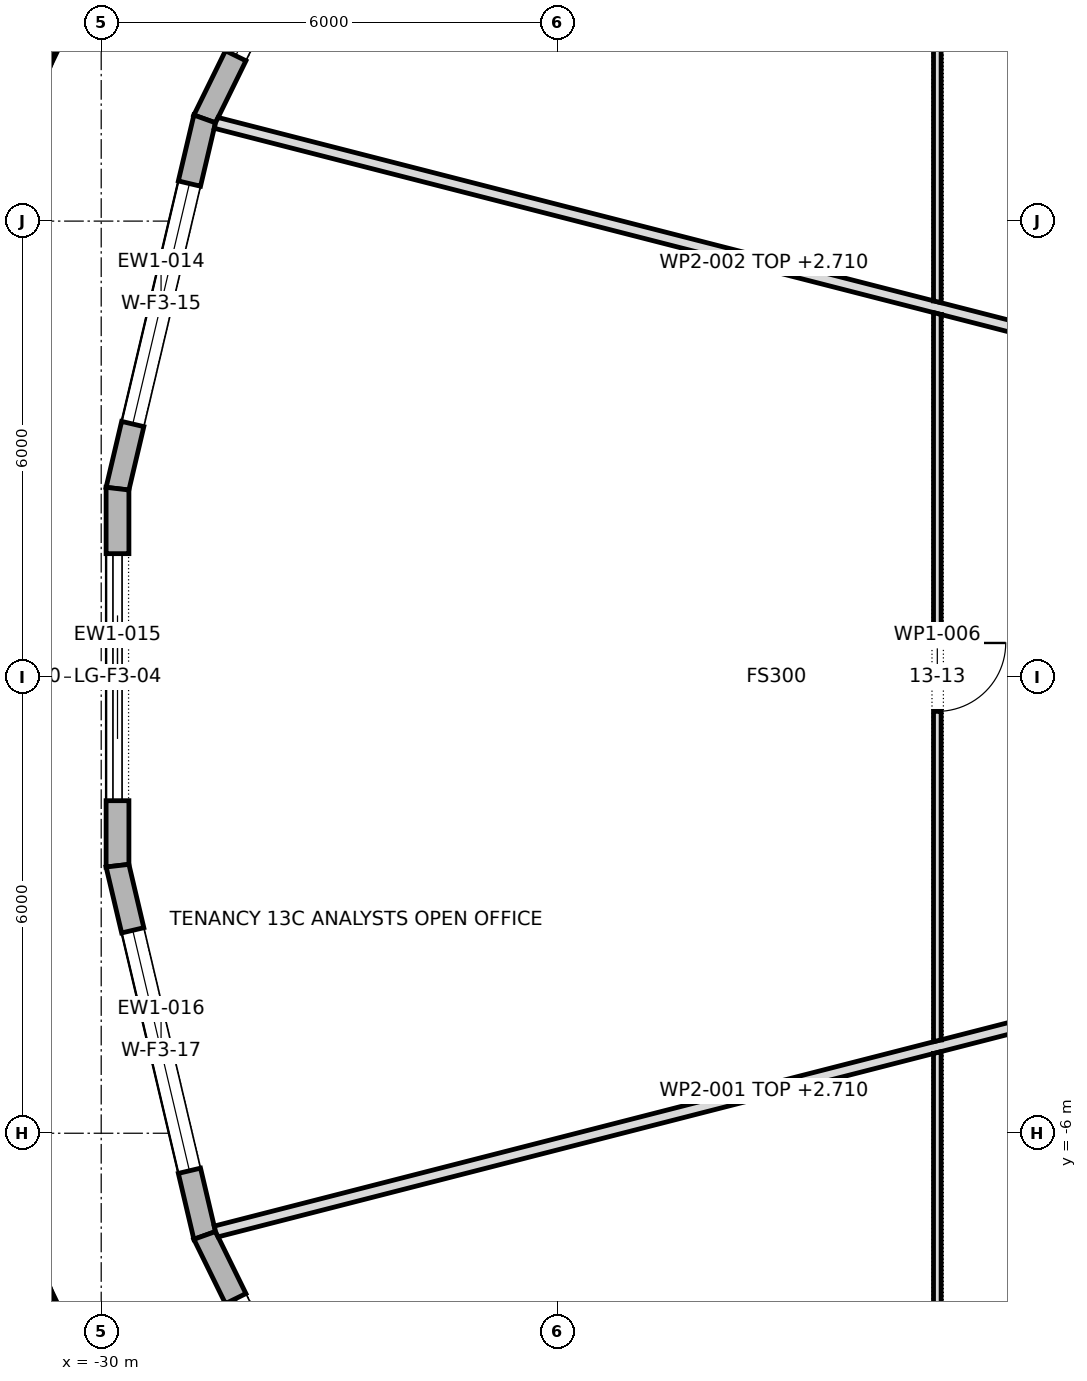
"""IFC4 building model, lengths in metres.
Left out: names, types, materials, properties, quantities, classifications, styles, units other than length and angle.
Written with IfcOpenShell. Run it as: python <this file> out.ifc"""

import sys

from ifc_helpers import new_model, si_unit, direction, frame, frame_2d, origin, origin_2d, place, context, subcontext, project, spatial, polyline, rectangle, outline, extrude, element, fill, save


model = new_model("IFC4")
c1 = context("Model", 3, precision=1e-05, world=origin(), true_north=direction((0.0, 1.0)))
c2 = subcontext(c1, "Body", "Model", "MODEL_VIEW")
j1 = project(units=[si_unit("LENGTHUNIT", "METRE"), si_unit("PLANEANGLEUNIT", "RADIAN")], contexts=[c1])
p1 = place(None, origin())
s1 = spatial("IfcSite", under=j1, at=p1, CompositionType="ELEMENT")
p2 = place(p1, origin())
s2 = spatial("IfcBuilding", under=s1, at=p2, CompositionType="ELEMENT")
p3 = place(p2, frame((0.0, 0.0, 190.9)))
s3 = spatial("IfcBuildingStorey", under=s2, at=p3, CompositionType="ELEMENT", Elevation=190.9)
for number, where, z_axis, x_axis in (
    (1, (-31.176, 8.106, 0.0), (0.0, 0.0, 1.0), (-0.334, -0.943, 0.0)),
    (2, (-31.176, -8.106, 0.0), (0.0, 0.0, 1.0), (0.334, -0.943, 0.0)),
):
    element("IfcColumn", number, at=place(p3, frame(where, z_axis=z_axis, x_axis=x_axis)), inside=s3, PredefinedType="COLUMN", context=c2, shape_type="SweptSolid", body=[
        extrude(rectangle(XDim=1.2, YDim=1.0, at=origin_2d()), origin(), (0.0, 0.0, 1.0), 4.0),
    ])
p4 = place(p3, frame((-26.39, 11.924, 0.0), z_axis=(0.0, 0.0, 1.0), x_axis=(-0.440694221881, -0.897657285829, 0.0)))
e3 = element("IfcWall", 3, at=p4, inside=s3, PredefinedType="STANDARD", context=c2, shape_type="SweptSolid", body=[
    extrude(outline(polyline([(-0.016, -0.15), (5.119, -0.15), (5.085, 0.15), (0.016, 0.15), (-0.016, -0.15)])), origin(), (0.0, 0.0, 1.0), 3.7),
])
p5 = place(p4, frame((0.926, 0.0, 0.6)))
e4 = element("IfcOpeningElement", 4, at=p5, cuts=e3, PredefinedType="OPENING", context=c2, shape_type="SweptSolid", body=[
    extrude(rectangle(XDim=3.25, YDim=2.65, at=frame_2d((1.625, 1.325))), frame((0.0, 0.162, 0.0), z_axis=(0.0, -1.0, 0.0), x_axis=(1.0, 0.0, 0.0)), (0.0, 0.0, 1.0), 0.324),
])
p6 = place(p3, frame((-28.639, 7.344, 0.0), z_axis=(0.0, 0.0, 1.0), x_axis=(-0.229455912692, -0.97331905567, 0.0)))
e5 = element("IfcWall", 5, at=p6, inside=s3, PredefinedType="STANDARD", context=c2, shape_type="SweptSolid", body=[
    extrude(outline(polyline([(-0.017, -0.15), (5.015, -0.15), (4.98, 0.15), (0.017, 0.15), (-0.017, -0.15)])), origin(), (0.0, 0.0, 1.0), 3.7),
])
p7 = place(p6, frame((0.874, 0.0, 0.6)))
e6 = element("IfcOpeningElement", 6, at=p7, cuts=e5, PredefinedType="OPENING", context=c2, shape_type="SweptSolid", body=[
    extrude(rectangle(XDim=3.25, YDim=2.65, at=frame_2d((1.625, 1.325))), frame((0.0, 0.162, 0.0), z_axis=(0.0, -1.0, 0.0), x_axis=(1.0, 0.0, 0.0)), (0.0, 0.0, 1.0), 0.324),
])
p8 = place(p3, frame((-29.785, 2.48, 0.0), z_axis=(0.0, 0.0, 1.0), x_axis=(0.0, -1.0, 0.0)))
e7 = element("IfcWall", 7, at=p8, inside=s3, PredefinedType="STANDARD", context=c2, shape_type="SweptSolid", body=[
    extrude(outline(polyline([(-0.017, -0.15), (4.977, -0.15), (4.943, 0.15), (0.017, 0.15), (-0.017, -0.15)])), origin(), (0.0, 0.0, 1.0), 3.7),
])
p9 = place(p8, frame((0.855, 0.0, 0.0)))
e8 = element("IfcOpeningElement", 8, at=p9, cuts=e7, PredefinedType="OPENING", context=c2, shape_type="SweptSolid", body=[
    extrude(rectangle(XDim=3.25, YDim=3.25, at=frame_2d((1.625, 1.625))), frame((0.0, 0.162, 0.0), z_axis=(0.0, -1.0, 0.0), x_axis=(1.0, 0.0, 0.0)), (0.0, 0.0, 1.0), 0.324),
])
p10 = place(p3, frame((-29.785, -2.48, 0.0), z_axis=(0.0, 0.0, 1.0), x_axis=(0.229455912692, -0.97331905567, 0.0)))
e9 = element("IfcWall", 9, at=p10, inside=s3, PredefinedType="STANDARD", context=c2, shape_type="SweptSolid", body=[
    extrude(outline(polyline([(-0.017, -0.15), (5.014, -0.15), (4.981, 0.15), (0.017, 0.15), (-0.017, -0.15)])), origin(), (0.0, 0.0, 1.0), 3.7),
])
p11 = place(p10, frame((0.874, 0.0, 0.6)))
e10 = element("IfcOpeningElement", 10, at=p11, cuts=e9, PredefinedType="OPENING", context=c2, shape_type="SweptSolid", body=[
    extrude(rectangle(XDim=3.25, YDim=2.65, at=frame_2d((1.625, 1.325))), frame((0.0, 0.162, 0.0), z_axis=(0.0, -1.0, 0.0), x_axis=(1.0, 0.0, 0.0)), (0.0, 0.0, 1.0), 0.324),
])
p12 = place(p3, frame((-28.639, -7.344, 0.0), z_axis=(0.0, 0.0, 1.0), x_axis=(0.440694221881, -0.897657285829, 0.0)))
e11 = element("IfcWall", 11, at=p12, inside=s3, PredefinedType="STANDARD", context=c2, shape_type="SweptSolid", body=[
    extrude(outline(polyline([(-0.017, -0.15), (5.118, -0.15), (5.086, 0.15), (0.017, 0.15), (-0.017, -0.15)])), origin(), (0.0, 0.0, 1.0), 3.7),
])
p13 = place(p12, frame((0.926, 0.0, 0.6)))
e12 = element("IfcOpeningElement", 12, at=p13, cuts=e11, PredefinedType="OPENING", context=c2, shape_type="SweptSolid", body=[
    extrude(rectangle(XDim=3.25, YDim=2.65, at=frame_2d((1.625, 1.325))), frame((0.0, 0.162, 0.0), z_axis=(0.0, -1.0, 0.0), x_axis=(1.0, 0.0, 0.0)), (0.0, 0.0, 1.0), 0.324),
])
p14 = place(p3, frame((-28.494, -7.294, 0.0), z_axis=(0.0, 0.0, 1.0), x_axis=(0.96870063855, 0.248231893342, 0.0)))
e13 = element("IfcWall", 13, at=p14, inside=s3, PredefinedType="PARTITIONING", context=c2, shape_type="SweptSolid", body=[
    extrude(outline(polyline([(0.014, -0.075), (1.957, -0.075), (3.901, -0.075), (5.844, -0.075), (7.787, -0.075), (9.73, -0.075), (9.731, -0.073), (9.736, -0.075), (11.446, -0.075), (13.156, -0.075), (14.866, -0.075), (14.904, 0.074), (14.904, 0.075), (13.227, 0.075), (11.549, 0.075), (9.872, 0.075), (9.872, 0.073), (9.866, 0.075), (7.893, 0.075), (5.92, 0.075), (3.947, 0.075), (1.973, 0.075), (0.0, 0.075), (0.0, -0.008), (0.014, -0.075)])), origin(), (0.0, 0.0, 1.0), 2.71),
])
p15 = place(p3, frame((-28.494, 7.294, 0.0), z_axis=(0.0, 0.0, 1.0), x_axis=(0.96870063855, -0.248231893342, 0.0)))
e14 = element("IfcWall", 14, at=p15, inside=s3, PredefinedType="PARTITIONING", context=c2, shape_type="SweptSolid", body=[
    extrude(outline(polyline([(0.0, -0.075), (1.973, -0.075), (3.947, -0.075), (5.92, -0.075), (7.893, -0.075), (9.866, -0.075), (9.872, -0.073), (9.872, -0.075), (11.549, -0.075), (13.227, -0.075), (14.904, -0.075), (14.904, -0.074), (14.866, 0.075), (13.156, 0.075), (11.446, 0.075), (9.736, 0.075), (9.731, 0.073), (9.73, 0.075), (7.787, 0.075), (5.844, 0.075), (3.901, 0.075), (1.957, 0.075), (0.014, 0.075), (0.0, 0.008), (0.0, -0.075)])), origin(), (0.0, 0.0, 1.0), 2.71),
])
p16 = place(p3, frame((-19.0, -13.095, 0.0), z_axis=(0.0, 0.0, 1.0), x_axis=(0.0, 1.0, 0.0)))
e15 = element("IfcWall", 15, at=p16, inside=s3, PredefinedType="PARTITIONING", context=c2, shape_type="SweptSolid", body=[
    extrude(outline(polyline([(8.169, -0.05), (8.169, -0.049), (8.144, 0.05), (6.515, 0.05), (4.886, 0.05), (3.258, 0.05), (1.629, 0.05), (0.0, 0.05), (0.0, 0.049), (0.069, -0.05), (1.689, -0.05), (3.309, -0.05), (4.929, -0.05), (6.549, -0.05), (8.169, -0.05)])), origin(), (0.0, 0.0, 1.0), 3.7),
])
p17 = place(p16, frame((3.64, 0.0, 0.0)))
e16 = element("IfcOpeningElement", 16, at=p17, cuts=e15, PredefinedType="OPENING", context=c2, shape_type="SweptSolid", body=[
    extrude(rectangle(XDim=0.9, YDim=2.1, at=frame_2d((0.45, 1.05))), frame((0.0, 0.062, 0.0), z_axis=(0.0, -1.0, 0.0), x_axis=(1.0, 0.0, 0.0)), (0.0, 0.0, 1.0), 0.124),
])
p18 = place(p3, frame((-19.0, -4.796, 0.0), z_axis=(0.0, 0.0, 1.0), x_axis=(0.0, 1.0, 0.0)))
e17 = element("IfcWall", 17, at=p18, inside=s3, PredefinedType="PARTITIONING", context=c2, shape_type="SweptSolid", body=[
    extrude(outline(polyline([(0.025, -0.05), (1.934, -0.05), (3.842, -0.05), (5.75, -0.05), (7.659, -0.05), (9.567, -0.05), (9.593, 0.049), (9.593, 0.05), (7.674, 0.05), (5.756, 0.05), (3.837, 0.05), (1.918, 0.05), (0.0, 0.05), (0.0, 0.049), (0.025, -0.05)])), origin(), (0.0, 0.0, 1.0), 3.7),
])
p19 = place(p18, frame((4.346, 0.0, 0.0)))
e18 = element("IfcOpeningElement", 18, at=p19, cuts=e17, PredefinedType="OPENING", context=c2, shape_type="SweptSolid", body=[
    extrude(rectangle(XDim=0.9, YDim=2.1, at=frame_2d((0.45, 1.05))), frame((0.0, 0.062, 0.0), z_axis=(0.0, -1.0, 0.0), x_axis=(1.0, 0.0, 0.0)), (0.0, 0.0, 1.0), 0.124),
])
p20 = place(p3, frame((-19.0, 4.926, 0.0), z_axis=(0.0, 0.0, 1.0), x_axis=(0.0, 1.0, 0.0)))
e19 = element("IfcWall", 19, at=p20, inside=s3, PredefinedType="PARTITIONING", context=c2, shape_type="SweptSolid", body=[
    extrude(outline(polyline([(0.0, -0.05), (1.62, -0.05), (3.239, -0.05), (4.859, -0.05), (6.479, -0.05), (8.098, -0.05), (8.162, 0.043), (8.169, 0.038), (8.177, 0.05), (8.177, 0.05), (6.547, 0.05), (4.917, 0.05), (3.286, 0.05), (1.656, 0.05), (0.025, 0.05), (0.0, -0.049), (0.0, -0.05)])), origin(), (0.0, 0.0, 1.0), 3.7),
])
p21 = place(p20, frame((3.629, 0.0, 0.0)))
e20 = element("IfcOpeningElement", 20, at=p21, cuts=e19, PredefinedType="OPENING", context=c2, shape_type="SweptSolid", body=[
    extrude(rectangle(XDim=0.9, YDim=2.1, at=frame_2d((0.45, 1.05))), frame((0.0, 0.062, 0.0), z_axis=(0.0, -1.0, 0.0), x_axis=(1.0, 0.0, 0.0)), (0.0, 0.0, 1.0), 0.124),
])
p22 = place(p5, origin())
e21 = element("IfcWindow", 21, at=p22, inside=s3, PartitioningType="TRIPLE_PANEL_VERTICAL", PredefinedType="WINDOW", context=c2, shape_type="SweptSolid", body=[
    extrude(rectangle(XDim=3.25, YDim=2.65, at=frame_2d((1.625, 1.325))), frame((0.0, 0.03, 0.0), z_axis=(0.0, -1.0, 0.0), x_axis=(1.0, 0.0, 0.0)), (0.0, 0.0, 1.0), 0.06),
])
fill(e4, e21)
p23 = place(p7, origin())
e22 = element("IfcWindow", 22, at=p23, inside=s3, PartitioningType="TRIPLE_PANEL_VERTICAL", PredefinedType="WINDOW", context=c2, shape_type="SweptSolid", body=[
    extrude(rectangle(XDim=3.25, YDim=2.65, at=frame_2d((1.625, 1.325))), frame((0.0, 0.03, 0.0), z_axis=(0.0, -1.0, 0.0), x_axis=(1.0, 0.0, 0.0)), (0.0, 0.0, 1.0), 0.06),
])
fill(e6, e22)
p24 = place(p9, origin())
e23 = element("IfcDoor", 23, at=p24, inside=s3, OperationType="DOUBLE_DOOR_SLIDING", PredefinedType="DOOR", context=c2, shape_type="SweptSolid", body=[
    extrude(rectangle(XDim=3.25, YDim=3.25, at=frame_2d((1.625, 1.625))), frame((0.0, 0.025, 0.0), z_axis=(0.0, -1.0, 0.0), x_axis=(1.0, 0.0, 0.0)), (0.0, 0.0, 1.0), 0.05),
])
fill(e8, e23)
p25 = place(p11, origin())
e24 = element("IfcWindow", 24, at=p25, inside=s3, PartitioningType="TRIPLE_PANEL_VERTICAL", PredefinedType="WINDOW", context=c2, shape_type="SweptSolid", body=[
    extrude(rectangle(XDim=3.25, YDim=2.65, at=frame_2d((1.625, 1.325))), frame((0.0, 0.03, 0.0), z_axis=(0.0, -1.0, 0.0), x_axis=(1.0, 0.0, 0.0)), (0.0, 0.0, 1.0), 0.06),
])
fill(e10, e24)
p26 = place(p13, origin())
e25 = element("IfcWindow", 25, at=p26, inside=s3, PartitioningType="TRIPLE_PANEL_VERTICAL", PredefinedType="WINDOW", context=c2, shape_type="SweptSolid", body=[
    extrude(rectangle(XDim=3.25, YDim=2.65, at=frame_2d((1.625, 1.325))), frame((0.0, 0.03, 0.0), z_axis=(0.0, -1.0, 0.0), x_axis=(1.0, 0.0, 0.0)), (0.0, 0.0, 1.0), 0.06),
])
fill(e12, e25)
p27 = place(p19, frame((0.9, 0.0, 0.0), z_axis=(0.0, 0.0, 1.0), x_axis=(-1.0, 0.0, 0.0)))
e26 = element("IfcDoor", 26, at=p27, inside=s3, OperationType="SINGLE_SWING_RIGHT", PredefinedType="DOOR", context=c2, shape_type="SweptSolid", body=[
    extrude(rectangle(XDim=0.9, YDim=2.1, at=frame_2d((0.45, 1.05))), frame((0.0, 0.025, 0.0), z_axis=(0.0, -1.0, 0.0), x_axis=(1.0, 0.0, 0.0)), (0.0, 0.0, 1.0), 0.05),
])
fill(e18, e26)
save(model, sys.argv[1])
